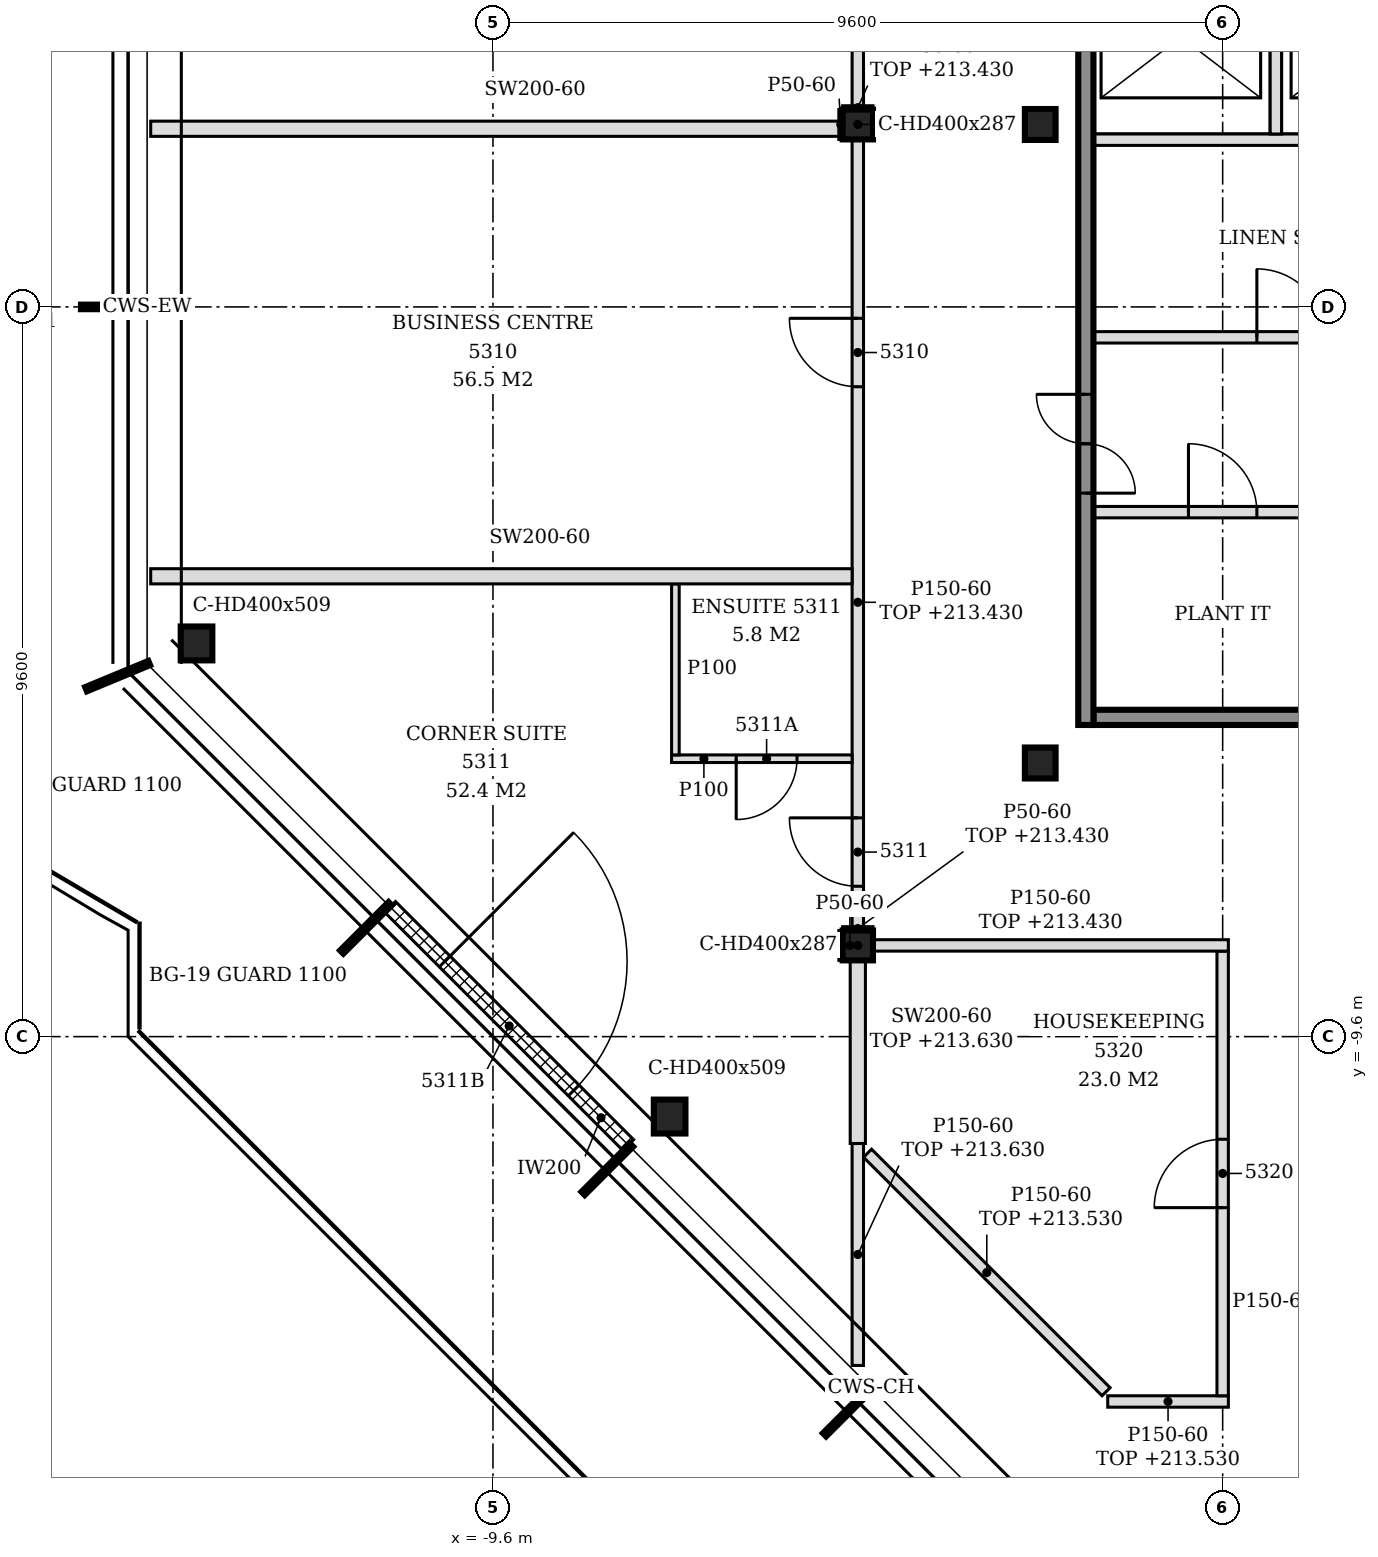
"""IFC4 building model, lengths in metres.
Left out: names, types, materials, properties, quantities, classifications, styles, units other than length and angle.
Written with IfcOpenShell. Run it as: python <this file> out.ifc"""

import sys

from ifc_helpers import new_model, si_unit, direction, frame, frame_2d, origin, origin_2d, place, context, subcontext, project, spatial, polyline, rectangle, i_section, outline, extrude, element, fill, save


model = new_model("IFC4")
c1 = context("Model", 3, precision=1e-05, world=origin(), true_north=direction((0.0, 1.0)))
c2 = subcontext(c1, "Body", "Model", "MODEL_VIEW")
j1 = project(units=[si_unit("LENGTHUNIT", "METRE"), si_unit("PLANEANGLEUNIT", "RADIAN")], contexts=[c1])
p1 = place(None, origin())
s1 = spatial("IfcSite", under=j1, at=p1, CompositionType="ELEMENT")
p2 = place(p1, origin())
s2 = spatial("IfcBuilding", under=s1, at=p2, CompositionType="ELEMENT")
p3 = place(p2, frame((0.0, 0.0, 210.6)))
s3 = spatial("IfcBuildingStorey", under=s2, at=p3, CompositionType="ELEMENT", Elevation=210.6)
for number, where, z_axis, x_axis in (
    (1, (-13.5, -4.427, -0.15), (0.0, 0.0, 1.0), (1.0, 0.0, 0.0)),
    (2, (-7.276, -10.652, -0.15), (0.0, 0.0, 1.0), (1.0, 0.0, 0.0)),
):
    element("IfcColumn", number, at=place(p3, frame(where, z_axis=z_axis, x_axis=x_axis)), inside=s3, PredefinedType="COLUMN", context=c2, shape_type="SweptSolid", body=[
        extrude(i_section(OverallWidth=0.416, OverallDepth=0.446, WebThickness=0.039, FlangeThickness=0.063, FilletRadius=0.015, at=origin_2d()), origin(), (0.0, 0.0, 1.0), 3.6),
    ])
for number, where, z_axis, x_axis in (
    (3, (-4.8, -8.4, -0.15), (0.0, 0.0, 1.0), (1.0, 0.0, 0.0)),
    (4, (-4.8, 2.4, -0.15), (0.0, 0.0, 1.0), (1.0, 0.0, 0.0)),
):
    element("IfcColumn", number, at=place(p3, frame(where, z_axis=z_axis, x_axis=x_axis)), inside=s3, PredefinedType="COLUMN", context=c2, shape_type="SweptSolid", body=[
        extrude(i_section(OverallWidth=0.399, OverallDepth=0.393, WebThickness=0.023, FlangeThickness=0.037, FilletRadius=0.015, at=origin_2d()), origin(), (0.0, 0.0, 1.0), 3.6),
    ])
for number, where, z_axis, x_axis in (
    (5, (-2.4, -6.0, -0.15), (0.0, 0.0, 1.0), (1.0, 0.0, 0.0)),
    (6, (-2.4, 2.4, -0.15), (0.0, 0.0, 1.0), (1.0, 0.0, 0.0)),
):
    element("IfcColumn", number, at=place(p3, frame(where, z_axis=z_axis, x_axis=x_axis)), inside=s3, PredefinedType="COLUMN", context=c2, shape_type="SweptSolid", body=[
        extrude(i_section(OverallWidth=0.404, OverallDepth=0.407, WebThickness=0.027, FlangeThickness=0.044, FilletRadius=0.015, at=origin_2d()), origin(), (0.0, 0.0, 1.0), 3.6),
    ])
p4 = place(p3, frame((-10.953, -7.893, 0.0), z_axis=(0.0, 0.0, 1.0), x_axis=(0.707106781187, -0.707106781187, 0.0)))
e7 = element("IfcWall", 7, at=p4, inside=s3, PredefinedType="NOTDEFINED", context=c2, shape_type="SweptSolid", body=[
    extrude(rectangle(XDim=4.431, YDim=0.2, at=frame_2d((2.215, 0.0))), origin(), (0.0, 0.0, 1.0), 3.45),
])
p5 = place(p4, frame((1.015, 0.0, 0.0)))
e8 = element("IfcOpeningElement", 8, at=p5, cuts=e7, PredefinedType="OPENING", context=c2, shape_type="SweptSolid", body=[
    extrude(rectangle(XDim=2.4, YDim=2.4, at=frame_2d((1.2, 1.2))), frame((0.0, 0.11, 0.0), z_axis=(0.0, -1.0, 0.0), x_axis=(1.0, 0.0, 0.0)), (0.0, 0.0, 1.0), 0.22),
])
p6 = place(p3, frame((-1.7, -5.4, 0.0), z_axis=(0.0, 0.0, 1.0), x_axis=(1.0, 0.0, 0.0)))
e9 = element("IfcWall", 9, at=p6, inside=s3, PredefinedType="SOLIDWALL", context=c2, shape_type="SweptSolid", body=[
    extrude(rectangle(XDim=7.9, YDim=0.2, at=frame_2d((3.95, 0.0))), origin(), (0.0, 0.0, 1.0), 3.45),
])
p7 = place(p3, frame((-1.7, -2.7, 0.0), z_axis=(0.0, 0.0, 1.0), x_axis=(1.0, 0.0, 0.0)))
e10 = element("IfcWall", 10, at=p7, inside=s3, PredefinedType="PARTITIONING", context=c2, shape_type="SweptSolid", body=[
    extrude(rectangle(XDim=7.825, YDim=0.15, at=frame_2d((3.913, 0.0))), origin(), (0.0, 0.0, 1.0), 3.45),
])
p8 = place(p7, frame((1.25, 0.0, 0.0)))
e11 = element("IfcOpeningElement", 11, at=p8, cuts=e10, PredefinedType="OPENING", context=c2, shape_type="SweptSolid", body=[
    extrude(rectangle(XDim=0.9, YDim=2.1, at=frame_2d((0.45, 1.05))), frame((0.0, 0.085, 0.0), z_axis=(0.0, -1.0, 0.0), x_axis=(1.0, 0.0, 0.0)), (0.0, 0.0, 1.0), 0.17),
])
p9 = place(p7, frame((5.25, 0.0, 0.0)))
e12 = element("IfcOpeningElement", 12, at=p9, cuts=e10, PredefinedType="OPENING", context=c2, shape_type="SweptSolid", body=[
    extrude(rectangle(XDim=0.9, YDim=2.1, at=frame_2d((0.45, 1.05))), frame((0.0, 0.085, 0.0), z_axis=(0.0, -1.0, 0.0), x_axis=(1.0, 0.0, 0.0)), (0.0, 0.0, 1.0), 0.17),
])
p10 = place(p3, frame((-1.7, -0.4, 0.0), z_axis=(0.0, 0.0, 1.0), x_axis=(1.0, 0.0, 0.0)))
e13 = element("IfcWall", 13, at=p10, inside=s3, PredefinedType="PARTITIONING", context=c2, shape_type="SweptSolid", body=[
    extrude(rectangle(XDim=10.825, YDim=0.15, at=frame_2d((5.413, 0.0))), origin(), (0.0, 0.0, 1.0), 3.45),
])
p11 = place(p10, frame((2.15, 0.0, 0.0)))
e14 = element("IfcOpeningElement", 14, at=p11, cuts=e13, PredefinedType="OPENING", context=c2, shape_type="SweptSolid", body=[
    extrude(rectangle(XDim=0.9, YDim=2.1, at=frame_2d((0.45, 1.05))), frame((0.0, 0.085, 0.0), z_axis=(0.0, -1.0, 0.0), x_axis=(1.0, 0.0, 0.0)), (0.0, 0.0, 1.0), 0.17),
])
p12 = place(p10, frame((7.65, 0.0, 0.0)))
e15 = element("IfcOpeningElement", 15, at=p12, cuts=e13, PredefinedType="OPENING", context=c2, shape_type="SweptSolid", body=[
    extrude(rectangle(XDim=0.9, YDim=2.1, at=frame_2d((0.45, 1.05))), frame((0.0, 0.085, 0.0), z_axis=(0.0, -1.0, 0.0), x_axis=(1.0, 0.0, 0.0)), (0.0, 0.0, 1.0), 0.17),
])
p13 = place(p3, frame((-1.7, 2.2, 0.0), z_axis=(0.0, 0.0, 1.0), x_axis=(1.0, 0.0, 0.0)))
e16 = element("IfcWall", 16, at=p13, inside=s3, PredefinedType="SOLIDWALL", context=c2, shape_type="SweptSolid", body=[
    extrude(rectangle(XDim=4.9, YDim=0.15, at=frame_2d((2.45, 0.0))), origin(), (0.0, 0.0, 1.0), 3.45),
])
p14 = place(p3, frame((-1.8, -5.5, 0.0), z_axis=(0.0, 0.0, 1.0), x_axis=(0.0, 1.0, 0.0)))
e17 = element("IfcWall", 17, at=p14, inside=s3, PredefinedType="SOLIDWALL", context=c2, shape_type="SweptSolid", body=[
    extrude(rectangle(XDim=15.8, YDim=0.2, at=frame_2d((7.9, 0.0))), origin(), (0.0, 0.0, 1.0), 3.45),
])
p15 = place(p14, frame((3.05, 0.0, 0.0)))
e18 = element("IfcOpeningElement", 18, at=p15, cuts=e17, PredefinedType="OPENING", context=c2, shape_type="SweptSolid", body=[
    extrude(rectangle(XDim=1.3, YDim=2.1, at=frame_2d((0.65, 1.05))), frame((0.0, 0.11, 0.0), z_axis=(0.0, -1.0, 0.0), x_axis=(1.0, 0.0, 0.0)), (0.0, 0.0, 1.0), 0.22),
])
p16 = place(p14, frame((11.45, 0.0, 0.0)))
e19 = element("IfcOpeningElement", 19, at=p16, cuts=e17, PredefinedType="OPENING", context=c2, shape_type="SweptSolid", body=[
    extrude(rectangle(XDim=1.3, YDim=2.1, at=frame_2d((0.65, 1.05))), frame((0.0, 0.11, 0.0), z_axis=(0.0, -1.0, 0.0), x_axis=(1.0, 0.0, 0.0)), (0.0, 0.0, 1.0), 0.22),
])
p17 = place(p3, frame((0.7, 2.275, 0.0), z_axis=(0.0, 0.0, 1.0), x_axis=(0.0, 1.0, 0.0)))
e20 = element("IfcWall", 20, at=p17, inside=s3, PredefinedType="SOLIDWALL", context=c2, shape_type="SweptSolid", body=[
    extrude(rectangle(XDim=2.55, YDim=0.15, at=frame_2d((1.275, 0.0))), origin(), (0.0, 0.0, 1.0), 3.45),
])
p18 = place(p3, frame((-1.512, -14.4, 0.0), z_axis=(0.0, 0.0, 1.0), x_axis=(1.0, 0.0, 0.0)))
e21 = element("IfcWall", 21, at=p18, inside=s3, PredefinedType="PARTITIONING", context=c2, shape_type="SweptSolid", body=[
    extrude(rectangle(XDim=1.587, YDim=0.15, at=frame_2d((0.793, 0.0))), origin(), (0.0, 0.0, 1.0), 2.93),
])
p19 = place(p3, frame((-1.534, -14.272, 0.0), z_axis=(0.0, 0.0, 1.0), x_axis=(-0.707134287042, 0.707079274261, 0.0)))
e22 = element("IfcWall", 22, at=p19, inside=s3, PredefinedType="PARTITIONING", context=c2, shape_type="SweptSolid", body=[
    extrude(rectangle(XDim=4.438, YDim=0.15, at=frame_2d((2.219, 0.0))), origin(), (0.0, 0.0, 1.0), 2.93),
])
p20 = place(p3, frame((0.0, -14.325, 0.0), z_axis=(0.0, 0.0, 1.0), x_axis=(0.0, 1.0, 0.0)))
e23 = element("IfcWall", 23, at=p20, inside=s3, PredefinedType="PARTITIONING", context=c2, shape_type="SweptSolid", body=[
    extrude(outline(polyline([(0.0, 0.0), (5.85, 0.0), (5.85, 2.83), (5.775, 2.83), (5.773, 3.45), (0.025, 3.45), (0.023, 2.93), (0.0, 2.93), (0.0, 0.0)])), frame((0.0, 0.075, 0.0), z_axis=(0.0, -1.0, 0.0), x_axis=(1.0, 0.0, 0.0)), (0.0, 0.0, 1.0), 0.15),
])
p21 = place(p20, frame((2.475, 0.0, 0.0)))
e24 = element("IfcOpeningElement", 24, at=p21, cuts=e23, PredefinedType="OPENING", context=c2, shape_type="SweptSolid", body=[
    extrude(rectangle(XDim=0.9, YDim=2.1, at=frame_2d((0.45, 1.05))), frame((0.0, 0.085, 0.0), z_axis=(0.0, -1.0, 0.0), x_axis=(1.0, 0.0, 0.0)), (0.0, 0.0, 1.0), 0.17),
])
p22 = place(p3, frame((-4.8, -13.926, 0.0), z_axis=(0.0, 0.0, 1.0), x_axis=(0.0, 1.0, 0.0)))
e25 = element("IfcWall", 25, at=p22, inside=s3, PredefinedType="PARTITIONING", context=c2, shape_type="SweptSolid", body=[
    extrude(outline(polyline([(0.0, 0.0), (2.92, 0.0), (2.92, 3.03), (1.369, 3.03), (1.367, 2.63), (0.229, 2.63), (0.227, 3.03), (0.0, 3.03), (0.0, 0.0)])), frame((0.0, 0.075, 0.0), z_axis=(0.0, -1.0, 0.0), x_axis=(1.0, 0.0, 0.0)), (0.0, 0.0, 1.0), 0.15),
])
p23 = place(p3, frame((-4.8, -11.006, 0.0), z_axis=(0.0, 0.0, 1.0), x_axis=(0.0, 1.0, 0.0)))
e26 = element("IfcWall", 26, at=p23, inside=s3, PredefinedType="PARTITIONING", context=c2, shape_type="SweptSolid", body=[
    extrude(rectangle(XDim=2.41, YDim=0.2, at=frame_2d((1.205, 0.0))), origin(), (0.0, 0.0, 1.0), 3.03),
])
p24 = place(p3, frame((-4.601, -8.4, 0.0), z_axis=(0.0, 0.0, 1.0), x_axis=(1.0, 0.0, 0.0)))
e27 = element("IfcWall", 27, at=p24, inside=s3, PredefinedType="PARTITIONING", context=c2, shape_type="SweptSolid", body=[
    extrude(rectangle(XDim=4.676, YDim=0.15, at=frame_2d((2.338, 0.0))), origin(), (0.0, 0.0, 1.0), 2.83),
])
p25 = place(p3, frame((-4.8, -8.204, 0.0), z_axis=(0.0, 0.0, 1.0), x_axis=(0.0, 1.0, 0.0)))
e28 = element("IfcWall", 28, at=p25, inside=s3, PredefinedType="PARTITIONING", context=c2, shape_type="SweptSolid", body=[
    extrude(rectangle(XDim=10.407, YDim=0.15, at=frame_2d((5.204, 0.0))), origin(), (0.0, 0.0, 1.0), 2.83),
])
p26 = place(p25, frame((7.154, 0.0, 0.0)))
e29 = element("IfcOpeningElement", 29, at=p26, cuts=e28, PredefinedType="OPENING", context=c2, shape_type="SweptSolid", body=[
    extrude(rectangle(XDim=0.9, YDim=2.1, at=frame_2d((0.45, 1.05))), frame((0.0, 0.085, 0.0), z_axis=(0.0, -1.0, 0.0), x_axis=(1.0, 0.0, 0.0)), (0.0, 0.0, 1.0), 0.17),
])
p27 = place(p25, frame((0.582, 0.0, 0.0)))
e30 = element("IfcOpeningElement", 30, at=p27, cuts=e28, PredefinedType="OPENING", context=c2, shape_type="SweptSolid", body=[
    extrude(rectangle(XDim=0.9, YDim=2.1, at=frame_2d((0.45, 1.05))), frame((0.0, 0.085, 0.0), z_axis=(0.0, -1.0, 0.0), x_axis=(1.0, 0.0, 0.0)), (0.0, 0.0, 1.0), 0.17),
])
p28 = place(p3, frame((-7.25, -5.944, 0.0), z_axis=(0.0, 0.0, 1.0), x_axis=(1.0, 0.0, 0.0)))
e31 = element("IfcWall", 31, at=p28, inside=s3, PredefinedType="PARTITIONING", context=c2, shape_type="SweptSolid", body=[
    extrude(outline(polyline([(0.0, 0.0), (2.375, 0.0), (2.375, 2.83), (2.3, 2.83), (2.298, 3.45), (0.0, 3.45), (0.0, 0.0)])), frame((0.0, 0.05, 0.0), z_axis=(0.0, -1.0, 0.0), x_axis=(1.0, 0.0, 0.0)), (0.0, 0.0, 1.0), 0.1),
])
p29 = place(p28, frame((0.85, 0.0, 0.0)))
e32 = element("IfcOpeningElement", 32, at=p29, cuts=e31, PredefinedType="OPENING", context=c2, shape_type="SweptSolid", body=[
    extrude(rectangle(XDim=0.8, YDim=2.1, at=frame_2d((0.4, 1.05))), frame((0.0, 0.06, 0.0), z_axis=(0.0, -1.0, 0.0), x_axis=(1.0, 0.0, 0.0)), (0.0, 0.0, 1.0), 0.12),
])
p30 = place(p3, frame((-7.2, -5.894, 0.0), z_axis=(0.0, 0.0, 1.0), x_axis=(0.0, 1.0, 0.0)))
e33 = element("IfcWall", 33, at=p30, inside=s3, PredefinedType="PARTITIONING", context=c2, shape_type="SweptSolid", body=[
    extrude(outline(polyline([(0.0, 0.0), (2.25, 0.0), (2.25, 3.45), (1.189, 3.45), (1.187, 2.98), (0.999, 2.98), (0.997, 3.45), (0.0, 3.45), (0.0, 0.0)])), frame((0.0, 0.05, 0.0), z_axis=(0.0, -1.0, 0.0), x_axis=(1.0, 0.0, 0.0)), (0.0, 0.0, 1.0), 0.1),
])
p31 = place(p3, frame((-14.103, -3.544, 0.0), z_axis=(0.0, 0.0, 1.0), x_axis=(1.0, 0.0, 0.0)))
e34 = element("IfcWall", 34, at=p31, inside=s3, PredefinedType="PARTITIONING", context=c2, shape_type="SweptSolid", body=[
    extrude(outline(polyline([(0.0, 0.0), (9.228, 0.0), (9.228, 2.83), (9.153, 2.83), (9.151, 3.45), (0.753, 3.45), (0.751, 2.93), (0.453, 2.93), (0.451, 3.45), (0.0, 3.45), (0.0, 0.0)])), frame((0.0, 0.1, 0.0), z_axis=(0.0, -1.0, 0.0), x_axis=(1.0, 0.0, 0.0)), (0.0, 0.0, 1.0), 0.2),
])
p32 = place(p3, frame((-14.103, 2.344, 0.0), z_axis=(0.0, 0.0, 1.0), x_axis=(1.0, 0.0, 0.0)))
e35 = element("IfcWall", 35, at=p32, inside=s3, PredefinedType="PARTITIONING", context=c2, shape_type="SweptSolid", body=[
    extrude(outline(polyline([(0.0, 0.0), (9.104, 0.0), (9.104, 3.45), (0.753, 3.45), (0.751, 2.93), (0.453, 2.93), (0.451, 3.45), (0.0, 3.45), (0.0, 0.0)])), frame((0.0, 0.1, 0.0), z_axis=(0.0, -1.0, 0.0), x_axis=(1.0, 0.0, 0.0)), (0.0, 0.0, 1.0), 0.2),
])
p33 = place(p3, frame((-4.8, 2.596, 0.0), z_axis=(0.0, 0.0, 1.0), x_axis=(0.0, 1.0, 0.0)))
e36 = element("IfcWall", 36, at=p33, inside=s3, PredefinedType="PARTITIONING", context=c2, shape_type="SweptSolid", body=[
    extrude(outline(polyline([(0.0, 0.0), (10.407, 0.0), (10.407, 2.63), (9.961, 2.63), (9.959, 2.83), (0.0, 2.83), (0.0, 0.0)])), frame((0.0, 0.075, 0.0), z_axis=(0.0, -1.0, 0.0), x_axis=(1.0, 0.0, 0.0)), (0.0, 0.0, 1.0), 0.15),
])
for number, where, z_axis, x_axis in (
    (37, (-5.024, -8.596, 0.0), (0.0, 0.0, 1.0), (0.0, 1.0, 0.0)),
    (38, (-5.024, 2.204, 0.0), (0.0, 0.0, 1.0), (0.0, 1.0, 0.0)),
):
    element("IfcWall", number, at=place(p3, frame(where, z_axis=z_axis, x_axis=x_axis)), inside=s3, PredefinedType="PARTITIONING", context=c2, shape_type="SweptSolid", body=[
        extrude(rectangle(XDim=0.393, YDim=0.05, at=frame_2d((0.196, 0.0))), origin(), (0.0, 0.0, 1.0), 3.45),
    ])
for number, where, z_axis, x_axis in (
    (39, (-5.0, -8.178, 0.0), (0.0, 0.0, 1.0), (1.0, 0.0, 0.0)),
    (40, (-5.0, 2.622, 0.0), (0.0, 0.0, 1.0), (1.0, 0.0, 0.0)),
):
    element("IfcWall", number, at=place(p3, frame(where, z_axis=z_axis, x_axis=x_axis)), inside=s3, PredefinedType="PARTITIONING", context=c2, shape_type="SweptSolid", body=[
        extrude(rectangle(XDim=0.399, YDim=0.05, at=frame_2d((0.199, 0.0))), origin(), (0.0, 0.0, 1.0), 2.83),
    ])
p34 = place(p5, origin())
e41 = element("IfcDoor", 41, at=p34, inside=s3, OperationType="SINGLE_SWING_LEFT", PredefinedType="DOOR", context=c2, shape_type="SweptSolid", body=[
    extrude(rectangle(XDim=2.4, YDim=2.4, at=frame_2d((1.2, 1.2))), frame((0.0, 0.025, 0.0), z_axis=(0.0, -1.0, 0.0), x_axis=(1.0, 0.0, 0.0)), (0.0, 0.0, 1.0), 0.05),
])
fill(e8, e41)
p35 = place(p15, origin())
e42 = element("IfcDoor", 42, at=p35, inside=s3, OperationType="DOUBLE_DOOR_SINGLE_SWING", PredefinedType="DOOR", context=c2, shape_type="SweptSolid", body=[
    extrude(rectangle(XDim=1.3, YDim=2.1, at=frame_2d((0.65, 1.05))), frame((0.0, 0.025, 0.0), z_axis=(0.0, -1.0, 0.0), x_axis=(1.0, 0.0, 0.0)), (0.0, 0.0, 1.0), 0.05),
])
fill(e18, e42)
p36 = place(p8, origin())
e43 = element("IfcDoor", 43, at=p36, inside=s3, OperationType="SINGLE_SWING_LEFT", PredefinedType="DOOR", context=c2, shape_type="SweptSolid", body=[
    extrude(rectangle(XDim=0.9, YDim=2.1, at=frame_2d((0.45, 1.05))), frame((0.0, 0.025, 0.0), z_axis=(0.0, -1.0, 0.0), x_axis=(1.0, 0.0, 0.0)), (0.0, 0.0, 1.0), 0.05),
])
fill(e11, e43)
p37 = place(p11, origin())
e44 = element("IfcDoor", 44, at=p37, inside=s3, OperationType="SINGLE_SWING_LEFT", PredefinedType="DOOR", context=c2, shape_type="SweptSolid", body=[
    extrude(rectangle(XDim=0.9, YDim=2.1, at=frame_2d((0.45, 1.05))), frame((0.0, 0.025, 0.0), z_axis=(0.0, -1.0, 0.0), x_axis=(1.0, 0.0, 0.0)), (0.0, 0.0, 1.0), 0.05),
])
fill(e14, e44)
p38 = place(p26, origin())
e45 = element("IfcDoor", 45, at=p38, inside=s3, OperationType="SINGLE_SWING_RIGHT", PredefinedType="DOOR", context=c2, shape_type="SweptSolid", body=[
    extrude(rectangle(XDim=0.9, YDim=2.1, at=frame_2d((0.45, 1.05))), frame((0.0, 0.025, 0.0), z_axis=(0.0, -1.0, 0.0), x_axis=(1.0, 0.0, 0.0)), (0.0, 0.0, 1.0), 0.05),
])
fill(e29, e45)
p39 = place(p27, origin())
e46 = element("IfcDoor", 46, at=p39, inside=s3, OperationType="SINGLE_SWING_RIGHT", PredefinedType="DOOR", context=c2, shape_type="SweptSolid", body=[
    extrude(rectangle(XDim=0.9, YDim=2.1, at=frame_2d((0.45, 1.05))), frame((0.0, 0.025, 0.0), z_axis=(0.0, -1.0, 0.0), x_axis=(1.0, 0.0, 0.0)), (0.0, 0.0, 1.0), 0.05),
])
fill(e30, e46)
p40 = place(p29, frame((0.8, 0.0, 0.0), z_axis=(0.0, 0.0, 1.0), x_axis=(-1.0, 0.0, 0.0)))
e47 = element("IfcDoor", 47, at=p40, inside=s3, OperationType="SINGLE_SWING_RIGHT", PredefinedType="DOOR", context=c2, shape_type="SweptSolid", body=[
    extrude(rectangle(XDim=0.8, YDim=2.1, at=frame_2d((0.4, 1.05))), frame((0.0, 0.025, 0.0), z_axis=(0.0, -1.0, 0.0), x_axis=(1.0, 0.0, 0.0)), (0.0, 0.0, 1.0), 0.05),
])
fill(e32, e47)
p41 = place(p21, origin())
e48 = element("IfcDoor", 48, at=p41, inside=s3, OperationType="SINGLE_SWING_LEFT", PredefinedType="DOOR", context=c2, shape_type="SweptSolid", body=[
    extrude(rectangle(XDim=0.9, YDim=2.1, at=frame_2d((0.45, 1.05))), frame((0.0, 0.025, 0.0), z_axis=(0.0, -1.0, 0.0), x_axis=(1.0, 0.0, 0.0)), (0.0, 0.0, 1.0), 0.05),
])
fill(e24, e48)
save(model, sys.argv[1])
